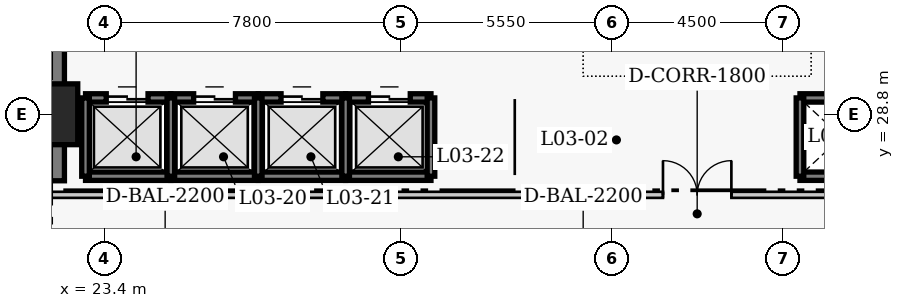
"""IFC4 building model, lengths in metres.
Left out: names, types, materials, properties, quantities, classifications, styles, units other than length and angle.
Written with IfcOpenShell. Run it as: python <this file> out.ifc"""

import sys

from ifc_helpers import new_model, si_unit, direction, frame, frame_2d, origin, origin_2d, place, context, subcontext, project, spatial, rectangle, extrude, element, fill, save


model = new_model("IFC4")
c1 = context("Model", 3, precision=1e-05, world=origin(), true_north=direction((0.0, 1.0)))
c2 = subcontext(c1, "Body", "Model", "MODEL_VIEW")
j1 = project(units=[si_unit("LENGTHUNIT", "METRE"), si_unit("PLANEANGLEUNIT", "RADIAN")], contexts=[c1])
p1 = place(None, origin())
s1 = spatial("IfcSite", under=j1, at=p1, CompositionType="ELEMENT")
p2 = place(p1, origin())
s2 = spatial("IfcBuilding", under=s1, at=p2, CompositionType="ELEMENT")
p3 = place(p2, frame((0.0, 0.0, 15.8)))
s3 = spatial("IfcBuildingStorey", under=s2, at=p3, CompositionType="ELEMENT", Elevation=15.8)
p4 = place(p3, frame((21.9, 27.05, 0.0), z_axis=(0.0, 0.0, 1.0), x_axis=(0.0, 1.0, 0.0)))
e1 = element("IfcWall", 1, at=p4, inside=s3, PredefinedType="SHEAR", context=c2, shape_type="SweptSolid", body=[
    extrude(rectangle(XDim=13.72, YDim=0.9, at=frame_2d((6.86, 0.0))), origin(), (0.0, 0.0, 1.0), 5.0),
])
p5 = place(p3, frame((21.9, 28.8, 0.0), z_axis=(0.0, 0.0, 1.0), x_axis=(1.0, 0.0, 0.0)))
e2 = element("IfcColumn", 2, at=p5, inside=s3, PredefinedType="COLUMN", context=c2, shape_type="SweptSolid", body=[
    extrude(rectangle(XDim=1.6, YDim=1.6, at=origin_2d()), origin(), (0.0, 0.0, 1.0), 5.0),
])
p6 = place(p3, frame((22.905, 29.23, 0.0), z_axis=(0.0, 0.0, 1.0), x_axis=(1.0, 0.0, 0.0)))
e3 = element("IfcWall", 3, at=p6, inside=s3, PredefinedType="SHEAR", context=c2, shape_type="SweptSolid", body=[
    extrude(rectangle(XDim=2.245, YDim=0.22, at=frame_2d((1.123, 0.0))), origin(), (0.0, 0.0, 1.0), 5.0),
])
p7 = place(p6, frame((0.545, 0.0, 0.0)))
e4 = element("IfcOpeningElement", 4, at=p7, cuts=e3, PredefinedType="OPENING", context=c2, shape_type="SweptSolid", body=[
    extrude(rectangle(XDim=1.1, YDim=2.15, at=frame_2d((0.55, 1.075))), frame((0.0, 0.12, 0.0), z_axis=(0.0, -1.0, 0.0), x_axis=(1.0, 0.0, 0.0)), (0.0, 0.0, 1.0), 0.24),
])
p8 = place(p3, frame((22.905, 27.17, 0.0), z_axis=(0.0, 0.0, 1.0), x_axis=(1.0, 0.0, 0.0)))
e5 = element("IfcWall", 5, at=p8, inside=s3, PredefinedType="SHEAR", context=c2, shape_type="SweptSolid", body=[
    extrude(rectangle(XDim=2.245, YDim=0.22, at=frame_2d((1.123, 0.0))), origin(), (0.0, 0.0, 1.0), 5.0),
])
p9 = place(p3, frame((22.905, 27.17, 0.0), z_axis=(0.0, 0.0, 1.0), x_axis=(0.0, 1.0, 0.0)))
e6 = element("IfcWall", 6, at=p9, inside=s3, PredefinedType="SHEAR", context=c2, shape_type="SweptSolid", body=[
    extrude(rectangle(XDim=2.06, YDim=0.2, at=frame_2d((1.03, 0.0))), origin(), (0.0, 0.0, 1.0), 5.0),
])
p10 = place(p3, frame((25.15, 29.23, 0.0), z_axis=(0.0, 0.0, 1.0), x_axis=(1.0, 0.0, 0.0)))
e7 = element("IfcWall", 7, at=p10, inside=s3, PredefinedType="SHEAR", context=c2, shape_type="SweptSolid", body=[
    extrude(rectangle(XDim=2.3, YDim=0.22, at=frame_2d((1.15, 0.0))), origin(), (0.0, 0.0, 1.0), 5.0),
])
p11 = place(p10, frame((0.6, 0.0, 0.0)))
e8 = element("IfcOpeningElement", 8, at=p11, cuts=e7, PredefinedType="OPENING", context=c2, shape_type="SweptSolid", body=[
    extrude(rectangle(XDim=1.1, YDim=2.15, at=frame_2d((0.55, 1.075))), frame((0.0, 0.12, 0.0), z_axis=(0.0, -1.0, 0.0), x_axis=(1.0, 0.0, 0.0)), (0.0, 0.0, 1.0), 0.24),
])
p12 = place(p3, frame((25.15, 27.17, 0.0), z_axis=(0.0, 0.0, 1.0), x_axis=(1.0, 0.0, 0.0)))
e9 = element("IfcWall", 9, at=p12, inside=s3, PredefinedType="SHEAR", context=c2, shape_type="SweptSolid", body=[
    extrude(rectangle(XDim=2.3, YDim=0.22, at=frame_2d((1.15, 0.0))), origin(), (0.0, 0.0, 1.0), 5.0),
])
p13 = place(p3, frame((25.15, 27.17, 0.0), z_axis=(0.0, 0.0, 1.0), x_axis=(0.0, 1.0, 0.0)))
e10 = element("IfcWall", 10, at=p13, inside=s3, PredefinedType="SHEAR", context=c2, shape_type="SweptSolid", body=[
    extrude(rectangle(XDim=2.06, YDim=0.2, at=frame_2d((1.03, 0.0))), origin(), (0.0, 0.0, 1.0), 5.0),
])
p14 = place(p3, frame((27.45, 29.23, 0.0), z_axis=(0.0, 0.0, 1.0), x_axis=(1.0, 0.0, 0.0)))
e11 = element("IfcWall", 11, at=p14, inside=s3, PredefinedType="SHEAR", context=c2, shape_type="SweptSolid", body=[
    extrude(rectangle(XDim=2.3, YDim=0.22, at=frame_2d((1.15, 0.0))), origin(), (0.0, 0.0, 1.0), 5.0),
])
p15 = place(p14, frame((0.6, 0.0, 0.0)))
e12 = element("IfcOpeningElement", 12, at=p15, cuts=e11, PredefinedType="OPENING", context=c2, shape_type="SweptSolid", body=[
    extrude(rectangle(XDim=1.1, YDim=2.15, at=frame_2d((0.55, 1.075))), frame((0.0, 0.12, 0.0), z_axis=(0.0, -1.0, 0.0), x_axis=(1.0, 0.0, 0.0)), (0.0, 0.0, 1.0), 0.24),
])
p16 = place(p3, frame((27.45, 27.17, 0.0), z_axis=(0.0, 0.0, 1.0), x_axis=(1.0, 0.0, 0.0)))
e13 = element("IfcWall", 13, at=p16, inside=s3, PredefinedType="SHEAR", context=c2, shape_type="SweptSolid", body=[
    extrude(rectangle(XDim=2.3, YDim=0.22, at=frame_2d((1.15, 0.0))), origin(), (0.0, 0.0, 1.0), 5.0),
])
p17 = place(p3, frame((27.45, 27.17, 0.0), z_axis=(0.0, 0.0, 1.0), x_axis=(0.0, 1.0, 0.0)))
e14 = element("IfcWall", 14, at=p17, inside=s3, PredefinedType="SHEAR", context=c2, shape_type="SweptSolid", body=[
    extrude(rectangle(XDim=2.06, YDim=0.2, at=frame_2d((1.03, 0.0))), origin(), (0.0, 0.0, 1.0), 5.0),
])
p18 = place(p3, frame((29.75, 29.23, 0.0), z_axis=(0.0, 0.0, 1.0), x_axis=(1.0, 0.0, 0.0)))
e15 = element("IfcWall", 15, at=p18, inside=s3, PredefinedType="SHEAR", context=c2, shape_type="SweptSolid", body=[
    extrude(rectangle(XDim=2.245, YDim=0.22, at=frame_2d((1.123, 0.0))), origin(), (0.0, 0.0, 1.0), 5.0),
])
p19 = place(p18, frame((0.6, 0.0, 0.0)))
e16 = element("IfcOpeningElement", 16, at=p19, cuts=e15, PredefinedType="OPENING", context=c2, shape_type="SweptSolid", body=[
    extrude(rectangle(XDim=1.1, YDim=2.15, at=frame_2d((0.55, 1.075))), frame((0.0, 0.12, 0.0), z_axis=(0.0, -1.0, 0.0), x_axis=(1.0, 0.0, 0.0)), (0.0, 0.0, 1.0), 0.24),
])
p20 = place(p3, frame((29.75, 27.17, 0.0), z_axis=(0.0, 0.0, 1.0), x_axis=(1.0, 0.0, 0.0)))
e17 = element("IfcWall", 17, at=p20, inside=s3, PredefinedType="SHEAR", context=c2, shape_type="SweptSolid", body=[
    extrude(rectangle(XDim=2.245, YDim=0.22, at=frame_2d((1.123, 0.0))), origin(), (0.0, 0.0, 1.0), 5.0),
])
for number, where, z_axis, x_axis in (
    (18, (29.75, 27.17, 0.0), (0.0, 0.0, 1.0), (0.0, 1.0, 0.0)),
    (19, (31.995, 27.17, 0.0), (0.0, 0.0, 1.0), (0.0, 1.0, 0.0)),
):
    element("IfcWall", number, at=place(p3, frame(where, z_axis=z_axis, x_axis=x_axis)), inside=s3, PredefinedType="SHEAR", context=c2, shape_type="SweptSolid", body=[
        extrude(rectangle(XDim=2.06, YDim=0.2, at=frame_2d((1.03, 0.0))), origin(), (0.0, 0.0, 1.0), 5.0),
    ])
for number, where, z_axis, x_axis in (
    (20, (41.705, 29.23, 0.0), (0.0, 0.0, 1.0), (1.0, 0.0, 0.0)),
    (21, (41.705, 27.17, 0.0), (0.0, 0.0, 1.0), (1.0, 0.0, 0.0)),
):
    element("IfcWall", number, at=place(p3, frame(where, z_axis=z_axis, x_axis=x_axis)), inside=s3, PredefinedType="SHEAR", context=c2, shape_type="SweptSolid", body=[
        extrude(rectangle(XDim=2.245, YDim=0.22, at=frame_2d((1.123, 0.0))), origin(), (0.0, 0.0, 1.0), 5.0),
    ])
p21 = place(p3, frame((41.705, 27.17, 0.0), z_axis=(0.0, 0.0, 1.0), x_axis=(0.0, 1.0, 0.0)))
e22 = element("IfcWall", 22, at=p21, inside=s3, PredefinedType="SHEAR", context=c2, shape_type="SweptSolid", body=[
    extrude(rectangle(XDim=2.06, YDim=0.2, at=frame_2d((1.03, 0.0))), origin(), (0.0, 0.0, 1.0), 5.0),
])
p22 = place(p3, frame((-2.98, 26.68, 0.0), z_axis=(0.0, 0.0, 1.0), x_axis=(1.0, 0.0, 0.0)))
e23 = element("IfcWall", 23, at=p22, inside=s3, PredefinedType="PARTITIONING", context=c2, shape_type="SweptSolid", body=[
    extrude(rectangle(XDim=83.96, YDim=0.16, at=frame_2d((41.98, 0.0))), origin(), (0.0, 0.0, 1.0), 4.58),
])
p23 = place(p22, frame((41.08, 0.0, 0.0)))
e24 = element("IfcOpeningElement", 24, at=p23, cuts=e23, PredefinedType="OPENING", context=c2, shape_type="SweptSolid", body=[
    extrude(rectangle(XDim=1.8, YDim=2.2, at=frame_2d((0.9, 1.1))), frame((0.0, 0.09, 0.0), z_axis=(0.0, -1.0, 0.0), x_axis=(1.0, 0.0, 0.0)), (0.0, 0.0, 1.0), 0.18),
])
p24 = place(p22, frame((4.042, 0.0, 0.0)))
e25 = element("IfcOpeningElement", 25, at=p24, cuts=e23, PredefinedType="OPENING", context=c2, shape_type="SweptSolid", body=[
    extrude(rectangle(XDim=1.8, YDim=2.2, at=frame_2d((0.9, 1.1))), frame((0.0, 0.09, 0.0), z_axis=(0.0, -1.0, 0.0), x_axis=(1.0, 0.0, 0.0)), (0.0, 0.0, 1.0), 0.18),
])
p25 = place(p22, frame((61.48, 0.0, 0.0)))
e26 = element("IfcOpeningElement", 26, at=p25, cuts=e23, PredefinedType="OPENING", context=c2, shape_type="SweptSolid", body=[
    extrude(rectangle(XDim=1.8, YDim=2.2, at=frame_2d((0.9, 1.1))), frame((0.0, 0.09, 0.0), z_axis=(0.0, -1.0, 0.0), x_axis=(1.0, 0.0, 0.0)), (0.0, 0.0, 1.0), 0.18),
])
p26 = place(p7, origin())
e27 = element("IfcDoor", 27, at=p26, inside=s3, OperationType="DOUBLE_DOOR_SLIDING", PredefinedType="DOOR", context=c2, shape_type="SweptSolid", body=[
    extrude(rectangle(XDim=1.1, YDim=2.15, at=frame_2d((0.55, 1.075))), frame((0.0, 0.025, 0.0), z_axis=(0.0, -1.0, 0.0), x_axis=(1.0, 0.0, 0.0)), (0.0, 0.0, 1.0), 0.05),
])
fill(e4, e27)
p27 = place(p11, origin())
e28 = element("IfcDoor", 28, at=p27, inside=s3, OperationType="DOUBLE_DOOR_SLIDING", PredefinedType="DOOR", context=c2, shape_type="SweptSolid", body=[
    extrude(rectangle(XDim=1.1, YDim=2.15, at=frame_2d((0.55, 1.075))), frame((0.0, 0.025, 0.0), z_axis=(0.0, -1.0, 0.0), x_axis=(1.0, 0.0, 0.0)), (0.0, 0.0, 1.0), 0.05),
])
fill(e8, e28)
p28 = place(p15, origin())
e29 = element("IfcDoor", 29, at=p28, inside=s3, OperationType="DOUBLE_DOOR_SLIDING", PredefinedType="DOOR", context=c2, shape_type="SweptSolid", body=[
    extrude(rectangle(XDim=1.1, YDim=2.15, at=frame_2d((0.55, 1.075))), frame((0.0, 0.025, 0.0), z_axis=(0.0, -1.0, 0.0), x_axis=(1.0, 0.0, 0.0)), (0.0, 0.0, 1.0), 0.05),
])
fill(e12, e29)
p29 = place(p19, origin())
e30 = element("IfcDoor", 30, at=p29, inside=s3, OperationType="DOUBLE_DOOR_SLIDING", PredefinedType="DOOR", context=c2, shape_type="SweptSolid", body=[
    extrude(rectangle(XDim=1.1, YDim=2.15, at=frame_2d((0.55, 1.075))), frame((0.0, 0.025, 0.0), z_axis=(0.0, -1.0, 0.0), x_axis=(1.0, 0.0, 0.0)), (0.0, 0.0, 1.0), 0.05),
])
fill(e16, e30)
p30 = place(p23, origin())
e31 = element("IfcDoor", 31, at=p30, inside=s3, OperationType="DOUBLE_DOOR_SINGLE_SWING", PredefinedType="DOOR", context=c2, shape_type="SweptSolid", body=[
    extrude(rectangle(XDim=1.8, YDim=2.2, at=frame_2d((0.9, 1.1))), frame((0.0, 0.025, 0.0), z_axis=(0.0, -1.0, 0.0), x_axis=(1.0, 0.0, 0.0)), (0.0, 0.0, 1.0), 0.05),
])
fill(e24, e31)
save(model, sys.argv[1])
